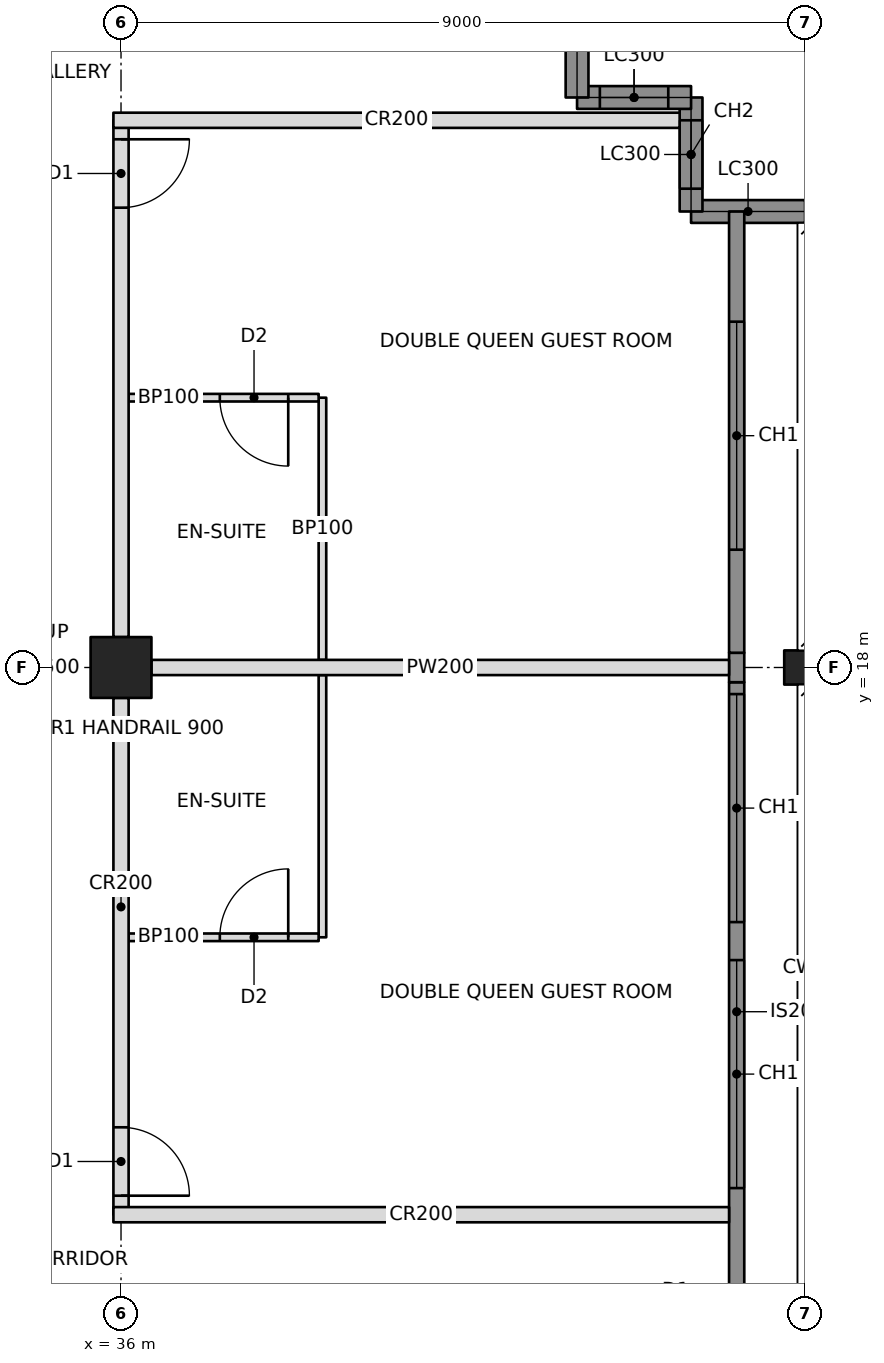
"""IFC4 building model, lengths in metres.
Left out: names, types, materials, properties, quantities, classifications, styles, units other than length and angle.
Written with IfcOpenShell. Run it as: python <this file> out.ifc"""

import sys

from ifc_helpers import new_model, si_unit, direction, frame, frame_2d, origin, origin_2d, place, context, subcontext, project, spatial, rectangle, hollow_rectangle, i_section, extrude, element, fill, save


model = new_model("IFC4")
c1 = context("Model", 3, precision=1e-05, world=origin(), true_north=direction((0.0, 1.0)))
c2 = subcontext(c1, "Body", "Model", "MODEL_VIEW")
j1 = project(units=[si_unit("LENGTHUNIT", "METRE"), si_unit("PLANEANGLEUNIT", "RADIAN")], contexts=[c1])
p1 = place(None, origin())
s1 = spatial("IfcSite", under=j1, at=p1, CompositionType="ELEMENT")
p2 = place(p1, origin())
s2 = spatial("IfcBuilding", under=s1, at=p2, CompositionType="ELEMENT")
p3 = place(p2, frame((0.0, 0.0, 187.6)))
s3 = spatial("IfcBuildingStorey", under=s2, at=p3, CompositionType="ELEMENT", Elevation=187.6)
p4 = place(p3, frame((36.0, 18.0, 0.0), z_axis=(0.0, 0.0, 1.0), x_axis=(0.0, 1.0, 0.0)))
e1 = element("IfcColumn", 1, at=p4, inside=s3, PredefinedType="COLUMN", context=c2, shape_type="SweptSolid", body=[
    extrude(hollow_rectangle(XDim=0.8, YDim=0.8, WallThickness=0.06, at=origin_2d()), origin(), (0.0, 0.0, 1.0), 3.4),
])
p5 = place(p3, frame((45.0, 18.0, 0.0), z_axis=(0.0, 0.0, 1.0), x_axis=(0.0, 1.0, 0.0)))
e2 = element("IfcColumn", 2, at=p5, inside=s3, PredefinedType="COLUMN", context=c2, shape_type="SweptSolid", body=[
    extrude(i_section(OverallWidth=0.449, OverallDepth=0.549, WebThickness=0.072, FlangeThickness=0.115, at=origin_2d()), origin(), (0.0, 0.0, 1.0), 3.4),
])
p6 = place(p3, frame((45.0, 24.0, 0.0), z_axis=(0.0, 0.0, 1.0), x_axis=(-1.0, 0.0, 0.0)))
e3 = element("IfcWall", 3, at=p6, inside=s3, PredefinedType="SOLIDWALL", context=c2, shape_type="SweptSolid", body=[
    extrude(rectangle(XDim=1.5, YDim=0.3, at=frame_2d((0.75, 0.0))), origin(), (0.0, 0.0, 1.0), 2.42),
])
p7 = place(p3, frame((43.5, 24.0, 0.0), z_axis=(0.0, 0.0, 1.0), x_axis=(0.0, 1.0, 0.0)))
e4 = element("IfcWall", 4, at=p7, inside=s3, PredefinedType="SOLIDWALL", context=c2, shape_type="SweptSolid", body=[
    extrude(rectangle(XDim=1.5, YDim=0.3, at=frame_2d((0.75, 0.0))), origin(), (0.0, 0.0, 1.0), 3.2),
])
p8 = place(p7, frame((0.3, 0.0, 0.6)))
e5 = element("IfcOpeningElement", 5, at=p8, cuts=e4, PredefinedType="OPENING", context=c2, shape_type="SweptSolid", body=[
    extrude(rectangle(XDim=0.9, YDim=2.2, at=frame_2d((0.45, 1.1))), frame((0.0, 0.16, 0.0), z_axis=(0.0, -1.0, 0.0), x_axis=(1.0, 0.0, 0.0)), (0.0, 0.0, 1.0), 0.32),
])
p9 = place(p3, frame((43.5, 25.5, 0.0), z_axis=(0.0, 0.0, 1.0), x_axis=(-1.0, 0.0, 0.0)))
e6 = element("IfcWall", 6, at=p9, inside=s3, PredefinedType="SOLIDWALL", context=c2, shape_type="SweptSolid", body=[
    extrude(rectangle(XDim=1.5, YDim=0.3, at=frame_2d((0.75, 0.0))), origin(), (0.0, 0.0, 1.0), 3.2),
])
p10 = place(p9, frame((0.3, 0.0, 0.6)))
e7 = element("IfcOpeningElement", 7, at=p10, cuts=e6, PredefinedType="OPENING", context=c2, shape_type="SweptSolid", body=[
    extrude(rectangle(XDim=0.9, YDim=2.2, at=frame_2d((0.45, 1.1))), frame((0.0, 0.16, 0.0), z_axis=(0.0, -1.0, 0.0), x_axis=(1.0, 0.0, 0.0)), (0.0, 0.0, 1.0), 0.32),
])
p11 = place(p3, frame((42.0, 25.5, 0.0), z_axis=(0.0, 0.0, 1.0), x_axis=(0.0, 1.0, 0.0)))
e8 = element("IfcWall", 8, at=p11, inside=s3, PredefinedType="SOLIDWALL", context=c2, shape_type="SweptSolid", body=[
    extrude(rectangle(XDim=1.5, YDim=0.3, at=frame_2d((0.75, 0.0))), origin(), (0.0, 0.0, 1.0), 2.42),
])
p12 = place(p3, frame((36.0, 10.8, 0.0), z_axis=(0.0, 0.0, 1.0), x_axis=(0.0, 1.0, 0.0)))
e9 = element("IfcWall", 9, at=p12, inside=s3, PredefinedType="PARTITIONING", context=c2, shape_type="SweptSolid", body=[
    extrude(rectangle(XDim=6.8, YDim=0.2, at=frame_2d((3.4, 0.0))), origin(), (0.0, 0.0, 1.0), 2.405),
])
p13 = place(p12, frame((0.25, 0.0, 0.0)))
e10 = element("IfcOpeningElement", 10, at=p13, cuts=e9, PredefinedType="OPENING", context=c2, shape_type="SweptSolid", body=[
    extrude(rectangle(XDim=0.9, YDim=2.1, at=frame_2d((0.45, 1.05))), frame((0.0, 0.11, 0.0), z_axis=(0.0, -1.0, 0.0), x_axis=(1.0, 0.0, 0.0)), (0.0, 0.0, 1.0), 0.22),
])
p14 = place(p3, frame((36.0, 18.4, 0.0), z_axis=(0.0, 0.0, 1.0), x_axis=(0.0, 1.0, 0.0)))
e11 = element("IfcWall", 11, at=p14, inside=s3, PredefinedType="PARTITIONING", context=c2, shape_type="SweptSolid", body=[
    extrude(rectangle(XDim=6.8, YDim=0.2, at=frame_2d((3.4, 0.0))), origin(), (0.0, 0.0, 1.0), 2.405),
])
p15 = place(p14, frame((5.65, 0.0, 0.0)))
e12 = element("IfcOpeningElement", 12, at=p15, cuts=e11, PredefinedType="OPENING", context=c2, shape_type="SweptSolid", body=[
    extrude(rectangle(XDim=0.9, YDim=2.1, at=frame_2d((0.45, 1.05))), frame((0.0, 0.11, 0.0), z_axis=(0.0, -1.0, 0.0), x_axis=(1.0, 0.0, 0.0)), (0.0, 0.0, 1.0), 0.22),
])
p16 = place(p3, frame((35.9, 10.8, 0.0), z_axis=(0.0, 0.0, 1.0), x_axis=(1.0, 0.0, 0.0)))
e13 = element("IfcWall", 13, at=p16, inside=s3, PredefinedType="PARTITIONING", context=c2, shape_type="SweptSolid", body=[
    extrude(rectangle(XDim=8.1, YDim=0.2, at=frame_2d((4.05, 0.0))), origin(), (0.0, 0.0, 1.0), 2.404),
])
p17 = place(p3, frame((35.9, 25.2, 0.0), z_axis=(0.0, 0.0, 1.0), x_axis=(1.0, 0.0, 0.0)))
e14 = element("IfcWall", 14, at=p17, inside=s3, PredefinedType="PARTITIONING", context=c2, shape_type="SweptSolid", body=[
    extrude(rectangle(XDim=7.45, YDim=0.2, at=frame_2d((3.725, 0.0))), origin(), (0.0, 0.0, 1.0), 2.404),
])
p18 = place(p3, frame((36.4, 18.0, 0.0), z_axis=(0.0, 0.0, 1.0), x_axis=(1.0, 0.0, 0.0)))
e15 = element("IfcWall", 15, at=p18, inside=s3, PredefinedType="PARTITIONING", context=c2, shape_type="SweptSolid", body=[
    extrude(rectangle(XDim=7.6, YDim=0.2, at=frame_2d((3.8, 0.0))), origin(), (0.0, 0.0, 1.0), 2.405),
])
p19 = place(p3, frame((38.65, 14.45, 0.0), z_axis=(0.0, 0.0, 1.0), x_axis=(0.0, 1.0, 0.0)))
e16 = element("IfcWall", 16, at=p19, inside=s3, PredefinedType="PARTITIONING", context=c2, shape_type="SweptSolid", body=[
    extrude(rectangle(XDim=3.45, YDim=0.1, at=frame_2d((1.725, 0.0))), origin(), (0.0, 0.0, 1.0), 2.404),
])
p20 = place(p3, frame((36.1, 14.45, 0.0), z_axis=(0.0, 0.0, 1.0), x_axis=(1.0, 0.0, 0.0)))
e17 = element("IfcWall", 17, at=p20, inside=s3, PredefinedType="PARTITIONING", context=c2, shape_type="SweptSolid", body=[
    extrude(rectangle(XDim=2.5, YDim=0.1, at=frame_2d((1.25, 0.0))), origin(), (0.0, 0.0, 1.0), 2.404),
])
p21 = place(p20, frame((1.2, 0.0, 0.0)))
e18 = element("IfcOpeningElement", 18, at=p21, cuts=e17, PredefinedType="OPENING", context=c2, shape_type="SweptSolid", body=[
    extrude(rectangle(XDim=0.9, YDim=2.1, at=frame_2d((0.45, 1.05))), frame((0.0, 0.06, 0.0), z_axis=(0.0, -1.0, 0.0), x_axis=(1.0, 0.0, 0.0)), (0.0, 0.0, 1.0), 0.12),
])
p22 = place(p3, frame((38.65, 18.1, 0.0), z_axis=(0.0, 0.0, 1.0), x_axis=(0.0, 1.0, 0.0)))
e19 = element("IfcWall", 19, at=p22, inside=s3, PredefinedType="PARTITIONING", context=c2, shape_type="SweptSolid", body=[
    extrude(rectangle(XDim=3.45, YDim=0.1, at=frame_2d((1.725, 0.0))), origin(), (0.0, 0.0, 1.0), 2.404),
])
p23 = place(p3, frame((36.1, 21.55, 0.0), z_axis=(0.0, 0.0, 1.0), x_axis=(1.0, 0.0, 0.0)))
e20 = element("IfcWall", 20, at=p23, inside=s3, PredefinedType="PARTITIONING", context=c2, shape_type="SweptSolid", body=[
    extrude(rectangle(XDim=2.5, YDim=0.1, at=frame_2d((1.25, 0.0))), origin(), (0.0, 0.0, 1.0), 2.404),
])
p24 = place(p23, frame((1.2, 0.0, 0.0)))
e21 = element("IfcOpeningElement", 21, at=p24, cuts=e20, PredefinedType="OPENING", context=c2, shape_type="SweptSolid", body=[
    extrude(rectangle(XDim=0.9, YDim=2.1, at=frame_2d((0.45, 1.05))), frame((0.0, 0.06, 0.0), z_axis=(0.0, -1.0, 0.0), x_axis=(1.0, 0.0, 0.0)), (0.0, 0.0, 1.0), 0.12),
])
p25 = place(p3, frame((44.1, 9.135, 0.0), z_axis=(0.0, 0.0, 1.0), x_axis=(0.0, 1.0, 0.0)))
e22 = element("IfcWall", 22, at=p25, inside=s3, PredefinedType="SOLIDWALL", context=c2, shape_type="SweptSolid", body=[
    extrude(rectangle(XDim=8.671, YDim=0.2, at=frame_2d((4.335, 0.0))), origin(), (0.0, 0.0, 1.0), 3.2),
])
p26 = place(p25, frame((2.015, 0.0, 0.6)))
e23 = element("IfcOpeningElement", 23, at=p26, cuts=e22, PredefinedType="OPENING", context=c2, shape_type="SweptSolid", body=[
    extrude(rectangle(XDim=3.0, YDim=2.2, at=frame_2d((1.5, 1.1))), frame((0.0, 0.11, 0.0), z_axis=(0.0, -1.0, 0.0), x_axis=(1.0, 0.0, 0.0)), (0.0, 0.0, 1.0), 0.22),
])
p27 = place(p25, frame((5.515, 0.0, 0.6)))
e24 = element("IfcOpeningElement", 24, at=p27, cuts=e22, PredefinedType="OPENING", context=c2, shape_type="SweptSolid", body=[
    extrude(rectangle(XDim=3.0, YDim=2.2, at=frame_2d((1.5, 1.1))), frame((0.0, 0.11, 0.0), z_axis=(0.0, -1.0, 0.0), x_axis=(1.0, 0.0, 0.0)), (0.0, 0.0, 1.0), 0.22),
])
p28 = place(p3, frame((44.1, 17.806, 0.0), z_axis=(0.0, 0.0, 1.0), x_axis=(0.0, 1.0, 0.0)))
e25 = element("IfcWall", 25, at=p28, inside=s3, PredefinedType="SOLIDWALL", context=c2, shape_type="SweptSolid", body=[
    extrude(rectangle(XDim=0.388, YDim=0.2, at=frame_2d((0.194, 0.0))), origin(), (0.0, 0.0, 1.0), 2.404),
])
p29 = place(p3, frame((44.1, 18.194, 0.0), z_axis=(0.0, 0.0, 1.0), x_axis=(0.0, 1.0, 0.0)))
e26 = element("IfcWall", 26, at=p29, inside=s3, PredefinedType="SOLIDWALL", context=c2, shape_type="SweptSolid", body=[
    extrude(rectangle(XDim=5.806, YDim=0.2, at=frame_2d((2.903, 0.0))), origin(), (0.0, 0.0, 1.0), 3.2),
])
p30 = place(p29, frame((1.356, 0.0, 0.6)))
e27 = element("IfcOpeningElement", 27, at=p30, cuts=e26, PredefinedType="OPENING", context=c2, shape_type="SweptSolid", body=[
    extrude(rectangle(XDim=3.0, YDim=2.2, at=frame_2d((1.5, 1.1))), frame((0.0, 0.11, 0.0), z_axis=(0.0, -1.0, 0.0), x_axis=(1.0, 0.0, 0.0)), (0.0, 0.0, 1.0), 0.22),
])
p31 = place(p8, origin())
e28 = element("IfcWindow", 28, at=p31, inside=s3, PartitioningType="SINGLE_PANEL", PredefinedType="WINDOW", context=c2, shape_type="SweptSolid", body=[
    extrude(rectangle(XDim=0.9, YDim=2.2, at=frame_2d((0.45, 1.1))), frame((0.0, 0.03, 0.0), z_axis=(0.0, -1.0, 0.0), x_axis=(1.0, 0.0, 0.0)), (0.0, 0.0, 1.0), 0.06),
])
fill(e5, e28)
p32 = place(p10, origin())
e29 = element("IfcWindow", 29, at=p32, inside=s3, PartitioningType="SINGLE_PANEL", PredefinedType="WINDOW", context=c2, shape_type="SweptSolid", body=[
    extrude(rectangle(XDim=0.9, YDim=2.2, at=frame_2d((0.45, 1.1))), frame((0.0, 0.03, 0.0), z_axis=(0.0, -1.0, 0.0), x_axis=(1.0, 0.0, 0.0)), (0.0, 0.0, 1.0), 0.06),
])
fill(e7, e29)
p33 = place(p26, origin())
e30 = element("IfcWindow", 30, at=p33, inside=s3, PartitioningType="TRIPLE_PANEL_VERTICAL", PredefinedType="WINDOW", context=c2, shape_type="SweptSolid", body=[
    extrude(rectangle(XDim=3.0, YDim=2.2, at=frame_2d((1.5, 1.1))), frame((0.0, 0.03, 0.0), z_axis=(0.0, -1.0, 0.0), x_axis=(1.0, 0.0, 0.0)), (0.0, 0.0, 1.0), 0.06),
])
fill(e23, e30)
p34 = place(p27, origin())
e31 = element("IfcWindow", 31, at=p34, inside=s3, PartitioningType="TRIPLE_PANEL_VERTICAL", PredefinedType="WINDOW", context=c2, shape_type="SweptSolid", body=[
    extrude(rectangle(XDim=3.0, YDim=2.2, at=frame_2d((1.5, 1.1))), frame((0.0, 0.03, 0.0), z_axis=(0.0, -1.0, 0.0), x_axis=(1.0, 0.0, 0.0)), (0.0, 0.0, 1.0), 0.06),
])
fill(e24, e31)
p35 = place(p30, origin())
e32 = element("IfcWindow", 32, at=p35, inside=s3, PartitioningType="TRIPLE_PANEL_VERTICAL", PredefinedType="WINDOW", context=c2, shape_type="SweptSolid", body=[
    extrude(rectangle(XDim=3.0, YDim=2.2, at=frame_2d((1.5, 1.1))), frame((0.0, 0.03, 0.0), z_axis=(0.0, -1.0, 0.0), x_axis=(1.0, 0.0, 0.0)), (0.0, 0.0, 1.0), 0.06),
])
fill(e27, e32)
p36 = place(p21, origin())
e33 = element("IfcDoor", 33, at=p36, inside=s3, OperationType="SINGLE_SWING_RIGHT", PredefinedType="DOOR", context=c2, shape_type="SweptSolid", body=[
    extrude(rectangle(XDim=0.9, YDim=2.1, at=frame_2d((0.45, 1.05))), frame((0.0, 0.025, 0.0), z_axis=(0.0, -1.0, 0.0), x_axis=(1.0, 0.0, 0.0)), (0.0, 0.0, 1.0), 0.05),
])
fill(e18, e33)
p37 = place(p13, frame((0.9, 0.0, 0.0), z_axis=(0.0, 0.0, 1.0), x_axis=(-1.0, 0.0, 0.0)))
e34 = element("IfcDoor", 34, at=p37, inside=s3, OperationType="SINGLE_SWING_RIGHT", PredefinedType="DOOR", context=c2, shape_type="SweptSolid", body=[
    extrude(rectangle(XDim=0.9, YDim=2.1, at=frame_2d((0.45, 1.05))), frame((0.0, 0.025, 0.0), z_axis=(0.0, -1.0, 0.0), x_axis=(1.0, 0.0, 0.0)), (0.0, 0.0, 1.0), 0.05),
])
fill(e10, e34)
p38 = place(p24, frame((0.9, 0.0, 0.0), z_axis=(0.0, 0.0, 1.0), x_axis=(-1.0, 0.0, 0.0)))
e35 = element("IfcDoor", 35, at=p38, inside=s3, OperationType="SINGLE_SWING_LEFT", PredefinedType="DOOR", context=c2, shape_type="SweptSolid", body=[
    extrude(rectangle(XDim=0.9, YDim=2.1, at=frame_2d((0.45, 1.05))), frame((0.0, 0.025, 0.0), z_axis=(0.0, -1.0, 0.0), x_axis=(1.0, 0.0, 0.0)), (0.0, 0.0, 1.0), 0.05),
])
fill(e21, e35)
p39 = place(p15, frame((0.9, 0.0, 0.0), z_axis=(0.0, 0.0, 1.0), x_axis=(-1.0, 0.0, 0.0)))
e36 = element("IfcDoor", 36, at=p39, inside=s3, OperationType="SINGLE_SWING_LEFT", PredefinedType="DOOR", context=c2, shape_type="SweptSolid", body=[
    extrude(rectangle(XDim=0.9, YDim=2.1, at=frame_2d((0.45, 1.05))), frame((0.0, 0.025, 0.0), z_axis=(0.0, -1.0, 0.0), x_axis=(1.0, 0.0, 0.0)), (0.0, 0.0, 1.0), 0.05),
])
fill(e12, e36)
save(model, sys.argv[1])
